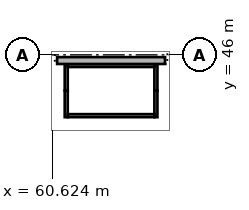
"""IFC4 building model, lengths in metres.
Left out: names, types, materials, properties, quantities, classifications, styles, units other than length and angle.
Written with IfcOpenShell. Run it as: python <this file> out.ifc"""

import sys

from ifc_helpers import new_model, si_unit, direction, frame, frame_2d, origin, origin_2d, place, context, subcontext, project, spatial, rectangle, extrude, element, fill, save


model = new_model("IFC4")
c1 = context("Model", 3, precision=1e-05, world=origin(), true_north=direction((0.0, 1.0)))
c2 = subcontext(c1, "Body", "Model", "MODEL_VIEW")
j1 = project(units=[si_unit("LENGTHUNIT", "METRE"), si_unit("PLANEANGLEUNIT", "RADIAN")], contexts=[c1])
p1 = place(None, origin())
s1 = spatial("IfcSite", under=j1, at=p1, CompositionType="ELEMENT")
p2 = place(p1, origin())
s2 = spatial("IfcBuilding", under=s1, at=p2, CompositionType="ELEMENT")
p3 = place(p2, origin())
s3 = spatial("IfcBuildingStorey", under=s2, at=p3, CompositionType="ELEMENT", Elevation=0.0)
for number, where, z_axis, x_axis in (
    (1, (60.0, 46.0, 0.0), (0.0, 0.0, 1.0), (1.0, 0.0, 0.0)),
    (2, (69.0, 46.0, 0.0), (0.0, 0.0, 1.0), (1.0, 0.0, 0.0)),
):
    element("IfcColumn", number, at=place(p3, frame(where, z_axis=z_axis, x_axis=x_axis)), inside=s3, PredefinedType="COLUMN", context=c2, shape_type="SweptSolid", body=[
        extrude(rectangle(XDim=1.6, YDim=1.2, at=origin_2d()), origin(), (0.0, 0.0, 1.0), 5.0),
    ])
for number, where, z_axis, x_axis in (
    (3, (61.55, 45.4, 0.0), (0.0, 0.0, 1.0), (0.0, -1.0, 0.0)),
    (4, (61.55, 43.65, 0.0), (0.0, 0.0, 1.0), (0.0, -1.0, 0.0)),
    (5, (67.45, 45.4, 0.0), (0.0, 0.0, 1.0), (0.0, -1.0, 0.0)),
    (6, (67.45, 43.65, 0.0), (0.0, 0.0, 1.0), (0.0, -1.0, 0.0)),
):
    element("IfcWall", number, at=place(p3, frame(where, z_axis=z_axis, x_axis=x_axis)), inside=s3, PredefinedType="SOLIDWALL", context=c2, shape_type="SweptSolid", body=[
        extrude(rectangle(XDim=1.75, YDim=0.2, at=frame_2d((0.875, 0.0))), origin(), (0.0, 0.0, 1.0), 3.2),
    ])
p4 = place(p3, frame((61.65, 42.0, 0.0), z_axis=(0.0, 0.0, 1.0), x_axis=(1.0, 0.0, 0.0)))
e7 = element("IfcWall", 7, at=p4, inside=s3, PredefinedType="SOLIDWALL", context=c2, shape_type="SweptSolid", body=[
    extrude(rectangle(XDim=5.7, YDim=0.2, at=frame_2d((2.85, 0.0))), origin(), (0.0, 0.0, 1.0), 3.2),
])
p5 = place(p4, frame((0.2, 0.0, 0.0)))
e8 = element("IfcOpeningElement", 8, at=p5, cuts=e7, PredefinedType="OPENING", context=c2, shape_type="SweptSolid", body=[
    extrude(rectangle(XDim=1.1, YDim=2.1, at=frame_2d((0.55, 1.05))), frame((0.0, 0.11, 0.0), z_axis=(0.0, -1.0, 0.0), x_axis=(1.0, 0.0, 0.0)), (0.0, 0.0, 1.0), 0.22),
])
p6 = place(p3, frame((61.65, 45.3, 0.0), z_axis=(0.0, 0.0, 1.0), x_axis=(1.0, 0.0, 0.0)))
e9 = element("IfcWall", 9, at=p6, inside=s3, PredefinedType="SOLIDWALL", context=c2, shape_type="SweptSolid", body=[
    extrude(rectangle(XDim=5.7, YDim=0.2, at=frame_2d((2.85, 0.0))), origin(), (0.0, 0.0, 1.0), 3.2),
])
p7 = place(p3, frame((60.95, 45.625, 0.0), z_axis=(0.0, 0.0, 1.0), x_axis=(1.0, 0.0, 0.0)))
e10 = element("IfcWall", 10, at=p7, inside=s3, PredefinedType="SOLIDWALL", context=c2, shape_type="SweptSolid", body=[
    extrude(rectangle(XDim=7.1, YDim=0.45, at=frame_2d((3.55, 0.0))), origin(), (0.0, 0.0, 1.0), 5.0),
])
p8 = place(p5, frame((1.1, 0.0, 0.0), z_axis=(0.0, 0.0, 1.0), x_axis=(-1.0, 0.0, 0.0)))
e11 = element("IfcDoor", 11, at=p8, inside=s3, OperationType="SINGLE_SWING_RIGHT", PredefinedType="DOOR", context=c2, shape_type="SweptSolid", body=[
    extrude(rectangle(XDim=1.1, YDim=2.1, at=frame_2d((0.55, 1.05))), frame((0.0, 0.025, 0.0), z_axis=(0.0, -1.0, 0.0), x_axis=(1.0, 0.0, 0.0)), (0.0, 0.0, 1.0), 0.05),
])
fill(e8, e11)
save(model, sys.argv[1])
